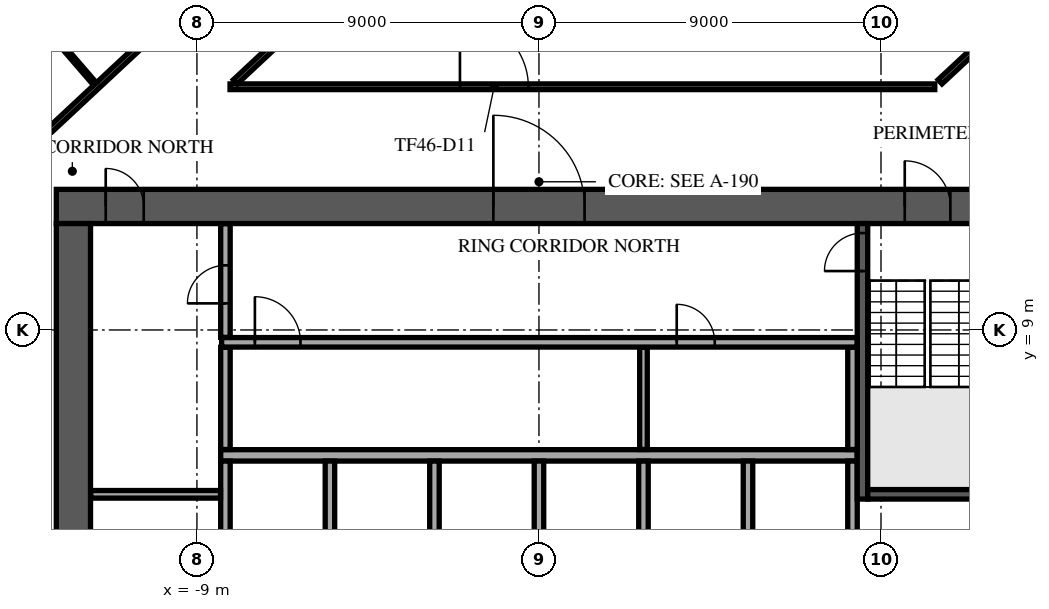
"""IFC4 building model, lengths in metres.
Left out: names, types, materials, properties, quantities, classifications, styles, units other than length and angle.
Written with IfcOpenShell. Run it as: python <this file> out.ifc"""

import sys

from ifc_helpers import new_model, si_unit, direction, frame, frame_2d, origin, place, context, subcontext, project, spatial, rectangle, extrude, element, fill, save


model = new_model("IFC4")
c1 = context("Model", 3, precision=1e-05, world=origin(), true_north=direction((0.0, 1.0)))
c2 = subcontext(c1, "Body", "Model", "MODEL_VIEW")
j1 = project(units=[si_unit("LENGTHUNIT", "METRE"), si_unit("PLANEANGLEUNIT", "RADIAN")], contexts=[c1])
p1 = place(None, origin())
s1 = spatial("IfcSite", under=j1, at=p1, CompositionType="ELEMENT")
p2 = place(p1, origin())
s2 = spatial("IfcBuilding", under=s1, at=p2, CompositionType="ELEMENT")
p3 = place(p2, frame((0.0, 0.0, 197.3)))
s3 = spatial("IfcBuildingStorey", under=s2, at=p3, CompositionType="ELEMENT", Elevation=197.3)
p4 = place(p3, frame((-12.7, 12.25, 0.0), z_axis=(0.0, 0.0, 1.0), x_axis=(1.0, 0.0, 0.0)))
e1 = element("IfcWall", 1, at=p4, inside=s3, PredefinedType="SHEAR", context=c2, shape_type="SweptSolid", body=[
    extrude(rectangle(XDim=25.4, YDim=0.9, at=frame_2d((12.7, 0.0))), origin(), (0.0, 0.0, 1.0), 3.62),
])
p5 = place(p4, frame((11.5, 0.0, 0.0)))
e2 = element("IfcOpeningElement", 2, at=p5, cuts=e1, PredefinedType="OPENING", context=c2, shape_type="SweptSolid", body=[
    extrude(rectangle(XDim=2.4, YDim=2.4, at=frame_2d((1.2, 1.2))), frame((0.0, 0.46, 0.0), z_axis=(0.0, -1.0, 0.0), x_axis=(1.0, 0.0, 0.0)), (0.0, 0.0, 1.0), 0.92),
])
p6 = place(p4, frame((22.325, 0.0, 0.0)))
e3 = element("IfcOpeningElement", 3, at=p6, cuts=e1, PredefinedType="OPENING", context=c2, shape_type="SweptSolid", body=[
    extrude(rectangle(XDim=1.2, YDim=2.1, at=frame_2d((0.6, 1.05))), frame((0.0, 0.46, 0.0), z_axis=(0.0, -1.0, 0.0), x_axis=(1.0, 0.0, 0.0)), (0.0, 0.0, 1.0), 0.92),
])
p7 = place(p4, frame((1.3, 0.0, 0.0)))
e4 = element("IfcOpeningElement", 4, at=p7, cuts=e1, PredefinedType="OPENING", context=c2, shape_type="SweptSolid", body=[
    extrude(rectangle(XDim=1.0, YDim=2.1, at=frame_2d((0.5, 1.05))), frame((0.0, 0.46, 0.0), z_axis=(0.0, -1.0, 0.0), x_axis=(1.0, 0.0, 0.0)), (0.0, 0.0, 1.0), 0.92),
])
p8 = place(p3, frame((-12.25, -11.8, 0.0), z_axis=(0.0, 0.0, 1.0), x_axis=(0.0, 1.0, 0.0)))
e5 = element("IfcWall", 5, at=p8, inside=s3, PredefinedType="SHEAR", context=c2, shape_type="SweptSolid", body=[
    extrude(rectangle(XDim=23.6, YDim=0.9, at=frame_2d((11.8, 0.0))), origin(), (0.0, 0.0, 1.0), 3.62),
])
p9 = place(p8, frame((10.6, 0.0, 0.0)))
e6 = element("IfcOpeningElement", 6, at=p9, cuts=e5, PredefinedType="OPENING", context=c2, shape_type="SweptSolid", body=[
    extrude(rectangle(XDim=2.4, YDim=2.4, at=frame_2d((1.2, 1.2))), frame((0.0, 0.46, 0.0), z_axis=(0.0, -1.0, 0.0), x_axis=(1.0, 0.0, 0.0)), (0.0, 0.0, 1.0), 0.92),
])
p10 = place(p3, frame((-8.375, 5.7, 0.0), z_axis=(0.0, 0.0, 1.0), x_axis=(1.0, 0.0, 0.0)))
e7 = element("IfcWall", 7, at=p10, inside=s3, PredefinedType="SOLIDWALL", context=c2, shape_type="SweptSolid", body=[
    extrude(rectangle(XDim=16.75, YDim=0.3, at=frame_2d((8.375, 0.0))), origin(), (0.0, 0.0, 1.0), 3.62),
])
for number, where, z_axis, x_axis in (
    (8, (-8.25, 2.85, 0.0), (0.0, 0.0, 1.0), (0.0, 1.0, 0.0)),
    (9, (-5.5, 2.85, 0.0), (0.0, 0.0, 1.0), (0.0, 1.0, 0.0)),
    (10, (-2.75, 2.85, 0.0), (0.0, 0.0, 1.0), (0.0, 1.0, 0.0)),
    (11, (0.0, 2.85, 0.0), (0.0, 0.0, 1.0), (0.0, 1.0, 0.0)),
    (12, (2.75, 2.85, 0.0), (0.0, 0.0, 1.0), (0.0, 1.0, 0.0)),
    (13, (5.5, 2.85, 0.0), (0.0, 0.0, 1.0), (0.0, 1.0, 0.0)),
    (14, (8.25, 2.85, 0.0), (0.0, 0.0, 1.0), (0.0, 1.0, 0.0)),
):
    element("IfcWall", number, at=place(p3, frame(where, z_axis=z_axis, x_axis=x_axis)), inside=s3, PredefinedType="SOLIDWALL", context=c2, shape_type="SweptSolid", body=[
        extrude(rectangle(XDim=2.7, YDim=0.25, at=frame_2d((1.35, 0.0))), origin(), (0.0, 0.0, 1.0), 3.62),
    ])
p11 = place(p3, frame((8.512, 4.55, 0.0), z_axis=(0.0, 0.0, 1.0), x_axis=(0.0, 1.0, 0.0)))
e15 = element("IfcWall", 15, at=p11, inside=s3, PredefinedType="SOLIDWALL", context=c2, shape_type="SweptSolid", body=[
    extrude(rectangle(XDim=7.25, YDim=0.275, at=frame_2d((3.625, 0.0))), origin(), (0.0, 0.0, 1.0), 3.62),
])
p12 = place(p11, frame((6.0, 0.0, 0.0)))
e16 = element("IfcOpeningElement", 16, at=p12, cuts=e15, PredefinedType="OPENING", context=c2, shape_type="SweptSolid", body=[
    extrude(rectangle(XDim=1.0, YDim=2.1, at=frame_2d((0.5, 1.05))), frame((0.0, 0.147, 0.0), z_axis=(0.0, -1.0, 0.0), x_axis=(1.0, 0.0, 0.0)), (0.0, 0.0, 1.0), 0.295),
])
p13 = place(p3, frame((8.65, 4.675, 0.0), z_axis=(0.0, 0.0, 1.0), x_axis=(1.0, 0.0, 0.0)))
e17 = element("IfcWall", 17, at=p13, inside=s3, PredefinedType="SOLIDWALL", context=c2, shape_type="SweptSolid", body=[
    extrude(rectangle(XDim=3.15, YDim=0.25, at=frame_2d((1.575, 0.0))), origin(), (0.0, 0.0, 1.0), 3.62),
])
p14 = place(p3, frame((-11.795, 4.675, 0.0), z_axis=(0.0, 0.0, 1.0), x_axis=(1.0, 0.0, 0.0)))
e18 = element("IfcWall", 18, at=p14, inside=s3, PredefinedType="PARTITIONING", context=c2, shape_type="SweptSolid", body=[
    extrude(rectangle(XDim=3.415, YDim=0.2, at=frame_2d((1.708, 0.0))), origin(), (0.0, 0.0, 1.0), 3.62),
])
p15 = place(p3, frame((-8.25, 5.855, 0.0), z_axis=(0.0, 0.0, 1.0), x_axis=(0.0, 1.0, 0.0)))
e19 = element("IfcWall", 19, at=p15, inside=s3, PredefinedType="PARTITIONING", context=c2, shape_type="SweptSolid", body=[
    extrude(rectangle(XDim=2.69, YDim=0.25, at=frame_2d((1.345, 0.0))), origin(), (0.0, 0.0, 1.0), 3.62),
])
p16 = place(p3, frame((2.75, 5.855, 0.0), z_axis=(0.0, 0.0, 1.0), x_axis=(0.0, 1.0, 0.0)))
e20 = element("IfcWall", 20, at=p16, inside=s3, PredefinedType="PARTITIONING", context=c2, shape_type="SweptSolid", body=[
    extrude(rectangle(XDim=2.69, YDim=0.2, at=frame_2d((1.345, 0.0))), origin(), (0.0, 0.0, 1.0), 3.62),
])
p17 = place(p3, frame((8.25, 5.855, 0.0), z_axis=(0.0, 0.0, 1.0), x_axis=(0.0, 1.0, 0.0)))
e21 = element("IfcWall", 21, at=p17, inside=s3, PredefinedType="PARTITIONING", context=c2, shape_type="SweptSolid", body=[
    extrude(rectangle(XDim=2.69, YDim=0.25, at=frame_2d((1.345, 0.0))), origin(), (0.0, 0.0, 1.0), 3.62),
])
p18 = place(p3, frame((-8.35, 8.675, 0.0), z_axis=(0.0, 0.0, 1.0), x_axis=(1.0, 0.0, 0.0)))
e22 = element("IfcWall", 22, at=p18, inside=s3, PredefinedType="PARTITIONING", context=c2, shape_type="SweptSolid", body=[
    extrude(rectangle(XDim=16.72, YDim=0.25, at=frame_2d((8.36, 0.0))), origin(), (0.0, 0.0, 1.0), 3.62),
])
p19 = place(p18, frame((0.875, 0.0, 0.0)))
e23 = element("IfcOpeningElement", 23, at=p19, cuts=e22, PredefinedType="OPENING", context=c2, shape_type="SweptSolid", body=[
    extrude(rectangle(XDim=1.2, YDim=2.1, at=frame_2d((0.6, 1.05))), frame((0.0, 0.135, 0.0), z_axis=(0.0, -1.0, 0.0), x_axis=(1.0, 0.0, 0.0)), (0.0, 0.0, 1.0), 0.27),
])
p20 = place(p18, frame((11.975, 0.0, 0.0)))
e24 = element("IfcOpeningElement", 24, at=p20, cuts=e22, PredefinedType="OPENING", context=c2, shape_type="SweptSolid", body=[
    extrude(rectangle(XDim=1.0, YDim=2.1, at=frame_2d((0.5, 1.05))), frame((0.0, 0.135, 0.0), z_axis=(0.0, -1.0, 0.0), x_axis=(1.0, 0.0, 0.0)), (0.0, 0.0, 1.0), 0.27),
])
p21 = place(p3, frame((-8.25, 8.805, 0.0), z_axis=(0.0, 0.0, 1.0), x_axis=(0.0, 1.0, 0.0)))
e25 = element("IfcWall", 25, at=p21, inside=s3, PredefinedType="PARTITIONING", context=c2, shape_type="SweptSolid", body=[
    extrude(rectangle(XDim=2.99, YDim=0.25, at=frame_2d((1.495, 0.0))), origin(), (0.0, 0.0, 1.0), 3.62),
])
p22 = place(p21, frame((0.895, 0.0, 0.0)))
e26 = element("IfcOpeningElement", 26, at=p22, cuts=e25, PredefinedType="OPENING", context=c2, shape_type="SweptSolid", body=[
    extrude(rectangle(XDim=1.0, YDim=2.1, at=frame_2d((0.5, 1.05))), frame((0.0, 0.135, 0.0), z_axis=(0.0, -1.0, 0.0), x_axis=(1.0, 0.0, 0.0)), (0.0, 0.0, 1.0), 0.27),
])
p23 = place(p3, frame((1.073, 34.773, 0.0), z_axis=(0.0, 0.0, 1.0), x_axis=(-0.731351780381, -0.682000420333, 0.0)))
e27 = element("IfcWall", 27, at=p23, inside=s3, PredefinedType="STANDARD", context=c2, shape_type="SweptSolid", body=[
    extrude(rectangle(XDim=49.0, YDim=0.6, at=frame_2d((24.5, 0.0))), origin(), (0.0, 0.0, 1.0), 3.62),
])
p24 = place(p23, frame((1.227, 0.0, 0.9)))
e28 = element("IfcOpeningElement", 28, at=p24, cuts=e27, PredefinedType="OPENING", context=c2, shape_type="SweptSolid", body=[
    extrude(rectangle(XDim=2.0, YDim=2.1, at=frame_2d((1.0, 1.05))), frame((0.0, 0.31, 0.0), z_axis=(0.0, -1.0, 0.0), x_axis=(1.0, 0.0, 0.0)), (0.0, 0.0, 1.0), 0.62),
])
p25 = place(p23, frame((5.682, 0.0, 0.9)))
e29 = element("IfcOpeningElement", 29, at=p25, cuts=e27, PredefinedType="OPENING", context=c2, shape_type="SweptSolid", body=[
    extrude(rectangle(XDim=2.0, YDim=2.1, at=frame_2d((1.0, 1.05))), frame((0.0, 0.31, 0.0), z_axis=(0.0, -1.0, 0.0), x_axis=(1.0, 0.0, 0.0)), (0.0, 0.0, 1.0), 0.62),
])
p26 = place(p23, frame((14.591, 0.0, 0.9)))
e30 = element("IfcOpeningElement", 30, at=p26, cuts=e27, PredefinedType="OPENING", context=c2, shape_type="SweptSolid", body=[
    extrude(rectangle(XDim=2.0, YDim=2.1, at=frame_2d((1.0, 1.05))), frame((0.0, 0.31, 0.0), z_axis=(0.0, -1.0, 0.0), x_axis=(1.0, 0.0, 0.0)), (0.0, 0.0, 1.0), 0.62),
])
p27 = place(p23, frame((19.045, 0.0, 0.9)))
e31 = element("IfcOpeningElement", 31, at=p27, cuts=e27, PredefinedType="OPENING", context=c2, shape_type="SweptSolid", body=[
    extrude(rectangle(XDim=2.0, YDim=2.1, at=frame_2d((1.0, 1.05))), frame((0.0, 0.31, 0.0), z_axis=(0.0, -1.0, 0.0), x_axis=(1.0, 0.0, 0.0)), (0.0, 0.0, 1.0), 0.62),
])
p28 = place(p23, frame((23.5, 0.0, 0.9)))
e32 = element("IfcOpeningElement", 32, at=p28, cuts=e27, PredefinedType="OPENING", context=c2, shape_type="SweptSolid", body=[
    extrude(rectangle(XDim=2.0, YDim=2.1, at=frame_2d((1.0, 1.05))), frame((0.0, 0.31, 0.0), z_axis=(0.0, -1.0, 0.0), x_axis=(1.0, 0.0, 0.0)), (0.0, 0.0, 1.0), 0.62),
])
p29 = place(p23, frame((27.955, 0.0, 0.9)))
e33 = element("IfcOpeningElement", 33, at=p29, cuts=e27, PredefinedType="OPENING", context=c2, shape_type="SweptSolid", body=[
    extrude(rectangle(XDim=2.0, YDim=2.1, at=frame_2d((1.0, 1.05))), frame((0.0, 0.31, 0.0), z_axis=(0.0, -1.0, 0.0), x_axis=(1.0, 0.0, 0.0)), (0.0, 0.0, 1.0), 0.62),
])
p30 = place(p23, frame((32.409, 0.0, 0.9)))
e34 = element("IfcOpeningElement", 34, at=p30, cuts=e27, PredefinedType="OPENING", context=c2, shape_type="SweptSolid", body=[
    extrude(rectangle(XDim=2.0, YDim=2.1, at=frame_2d((1.0, 1.05))), frame((0.0, 0.31, 0.0), z_axis=(0.0, -1.0, 0.0), x_axis=(1.0, 0.0, 0.0)), (0.0, 0.0, 1.0), 0.62),
])
p31 = place(p23, frame((36.864, 0.0, 0.9)))
e35 = element("IfcOpeningElement", 35, at=p31, cuts=e27, PredefinedType="OPENING", context=c2, shape_type="SweptSolid", body=[
    extrude(rectangle(XDim=2.0, YDim=2.1, at=frame_2d((1.0, 1.05))), frame((0.0, 0.31, 0.0), z_axis=(0.0, -1.0, 0.0), x_axis=(1.0, 0.0, 0.0)), (0.0, 0.0, 1.0), 0.62),
])
p32 = place(p23, frame((41.318, 0.0, 0.9)))
e36 = element("IfcOpeningElement", 36, at=p32, cuts=e27, PredefinedType="OPENING", context=c2, shape_type="SweptSolid", body=[
    extrude(rectangle(XDim=2.0, YDim=2.1, at=frame_2d((1.0, 1.05))), frame((0.0, 0.31, 0.0), z_axis=(0.0, -1.0, 0.0), x_axis=(1.0, 0.0, 0.0)), (0.0, 0.0, 1.0), 0.62),
])
p33 = place(p23, frame((45.773, 0.0, 0.9)))
e37 = element("IfcOpeningElement", 37, at=p33, cuts=e27, PredefinedType="OPENING", context=c2, shape_type="SweptSolid", body=[
    extrude(rectangle(XDim=2.0, YDim=2.1, at=frame_2d((1.0, 1.05))), frame((0.0, 0.31, 0.0), z_axis=(0.0, -1.0, 0.0), x_axis=(1.0, 0.0, 0.0)), (0.0, 0.0, 1.0), 0.62),
])
p34 = place(p3, frame((35.02, 5.994, 0.0), z_axis=(0.0, 0.0, 1.0), x_axis=(-0.682002361324, 0.731349970362, 0.0)))
e38 = element("IfcWall", 38, at=p34, inside=s3, PredefinedType="STANDARD", context=c2, shape_type="SweptSolid", body=[
    extrude(rectangle(XDim=39.0, YDim=0.6, at=frame_2d((19.5, 0.0))), origin(), (0.0, 0.0, 1.0), 3.62),
])
p35 = place(p34, frame((1.217, 0.0, 0.9)))
e39 = element("IfcOpeningElement", 39, at=p35, cuts=e38, PredefinedType="OPENING", context=c2, shape_type="SweptSolid", body=[
    extrude(rectangle(XDim=1.9, YDim=2.1, at=frame_2d((0.95, 1.05))), frame((0.0, 0.31, 0.0), z_axis=(0.0, -1.0, 0.0), x_axis=(1.0, 0.0, 0.0)), (0.0, 0.0, 1.0), 0.62),
])
p36 = place(p34, frame((5.55, 0.0, 0.9)))
e40 = element("IfcOpeningElement", 40, at=p36, cuts=e38, PredefinedType="OPENING", context=c2, shape_type="SweptSolid", body=[
    extrude(rectangle(XDim=1.9, YDim=2.1, at=frame_2d((0.95, 1.05))), frame((0.0, 0.31, 0.0), z_axis=(0.0, -1.0, 0.0), x_axis=(1.0, 0.0, 0.0)), (0.0, 0.0, 1.0), 0.62),
])
p37 = place(p34, frame((9.883, 0.0, 0.9)))
e41 = element("IfcOpeningElement", 41, at=p37, cuts=e38, PredefinedType="OPENING", context=c2, shape_type="SweptSolid", body=[
    extrude(rectangle(XDim=1.9, YDim=2.1, at=frame_2d((0.95, 1.05))), frame((0.0, 0.31, 0.0), z_axis=(0.0, -1.0, 0.0), x_axis=(1.0, 0.0, 0.0)), (0.0, 0.0, 1.0), 0.62),
])
p38 = place(p34, frame((14.217, 0.0, 0.9)))
e42 = element("IfcOpeningElement", 42, at=p38, cuts=e38, PredefinedType="OPENING", context=c2, shape_type="SweptSolid", body=[
    extrude(rectangle(XDim=1.9, YDim=2.1, at=frame_2d((0.95, 1.05))), frame((0.0, 0.31, 0.0), z_axis=(0.0, -1.0, 0.0), x_axis=(1.0, 0.0, 0.0)), (0.0, 0.0, 1.0), 0.62),
])
p39 = place(p34, frame((18.55, 0.0, 0.9)))
e43 = element("IfcOpeningElement", 43, at=p39, cuts=e38, PredefinedType="OPENING", context=c2, shape_type="SweptSolid", body=[
    extrude(rectangle(XDim=1.9, YDim=2.1, at=frame_2d((0.95, 1.05))), frame((0.0, 0.31, 0.0), z_axis=(0.0, -1.0, 0.0), x_axis=(1.0, 0.0, 0.0)), (0.0, 0.0, 1.0), 0.62),
])
p40 = place(p34, frame((22.883, 0.0, 0.9)))
e44 = element("IfcOpeningElement", 44, at=p40, cuts=e38, PredefinedType="OPENING", context=c2, shape_type="SweptSolid", body=[
    extrude(rectangle(XDim=1.9, YDim=2.1, at=frame_2d((0.95, 1.05))), frame((0.0, 0.31, 0.0), z_axis=(0.0, -1.0, 0.0), x_axis=(1.0, 0.0, 0.0)), (0.0, 0.0, 1.0), 0.62),
])
p41 = place(p34, frame((27.217, 0.0, 0.9)))
e45 = element("IfcOpeningElement", 45, at=p41, cuts=e38, PredefinedType="OPENING", context=c2, shape_type="SweptSolid", body=[
    extrude(rectangle(XDim=1.9, YDim=2.1, at=frame_2d((0.95, 1.05))), frame((0.0, 0.31, 0.0), z_axis=(0.0, -1.0, 0.0), x_axis=(1.0, 0.0, 0.0)), (0.0, 0.0, 1.0), 0.62),
])
p42 = place(p34, frame((31.55, 0.0, 0.9)))
e46 = element("IfcOpeningElement", 46, at=p42, cuts=e38, PredefinedType="OPENING", context=c2, shape_type="SweptSolid", body=[
    extrude(rectangle(XDim=1.9, YDim=2.1, at=frame_2d((0.95, 1.05))), frame((0.0, 0.31, 0.0), z_axis=(0.0, -1.0, 0.0), x_axis=(1.0, 0.0, 0.0)), (0.0, 0.0, 1.0), 0.62),
])
p43 = place(p34, frame((35.883, 0.0, 0.9)))
e47 = element("IfcOpeningElement", 47, at=p43, cuts=e38, PredefinedType="OPENING", context=c2, shape_type="SweptSolid", body=[
    extrude(rectangle(XDim=1.9, YDim=2.1, at=frame_2d((0.95, 1.05))), frame((0.0, 0.31, 0.0), z_axis=(0.0, -1.0, 0.0), x_axis=(1.0, 0.0, 0.0)), (0.0, 0.0, 1.0), 0.62),
])
p44 = place(p3, frame((-24.623, 3.301, 0.0), z_axis=(0.0, 0.0, 1.0), x_axis=(0.731351215564, 0.68200102602, 0.0)))
e48 = element("IfcWall", 48, at=p44, inside=s3, PredefinedType="PARTITIONING", context=c2, shape_type="SweptSolid", body=[
    extrude(rectangle(XDim=31.513, YDim=0.15, at=frame_2d((15.757, 0.0))), origin(), (0.0, 0.0, 1.0), 3.17),
])
p45 = place(p44, frame((1.05, 0.0, 0.0)))
e49 = element("IfcOpeningElement", 49, at=p45, cuts=e48, PredefinedType="OPENING", context=c2, shape_type="SweptSolid", body=[
    extrude(rectangle(XDim=1.8, YDim=2.1, at=frame_2d((0.9, 1.05))), frame((0.0, 0.085, 0.0), z_axis=(0.0, -1.0, 0.0), x_axis=(1.0, 0.0, 0.0)), (0.0, 0.0, 1.0), 0.17),
])
p46 = place(p44, frame((5.55, 0.0, 0.0)))
e50 = element("IfcOpeningElement", 50, at=p46, cuts=e48, PredefinedType="OPENING", context=c2, shape_type="SweptSolid", body=[
    extrude(rectangle(XDim=1.0, YDim=2.1, at=frame_2d((0.5, 1.05))), frame((0.0, 0.085, 0.0), z_axis=(0.0, -1.0, 0.0), x_axis=(1.0, 0.0, 0.0)), (0.0, 0.0, 1.0), 0.17),
])
p47 = place(p44, frame((10.917, 0.0, 0.0)))
e51 = element("IfcOpeningElement", 51, at=p47, cuts=e48, PredefinedType="OPENING", context=c2, shape_type="SweptSolid", body=[
    extrude(rectangle(XDim=1.0, YDim=2.1, at=frame_2d((0.5, 1.05))), frame((0.0, 0.085, 0.0), z_axis=(0.0, -1.0, 0.0), x_axis=(1.0, 0.0, 0.0)), (0.0, 0.0, 1.0), 0.17),
])
p48 = place(p44, frame((20.812, 0.0, 0.0)))
e52 = element("IfcOpeningElement", 52, at=p48, cuts=e48, PredefinedType="OPENING", context=c2, shape_type="SweptSolid", body=[
    extrude(rectangle(XDim=1.0, YDim=2.1, at=frame_2d((0.5, 1.05))), frame((0.0, 0.085, 0.0), z_axis=(0.0, -1.0, 0.0), x_axis=(1.0, 0.0, 0.0)), (0.0, 0.0, 1.0), 0.17),
])
p49 = place(p3, frame((-8.129, 15.4, 0.0), z_axis=(0.0, 0.0, 1.0), x_axis=(1.0, 0.0, 0.0)))
e53 = element("IfcWall", 53, at=p49, inside=s3, PredefinedType="PARTITIONING", context=c2, shape_type="SweptSolid", body=[
    extrude(rectangle(XDim=18.544, YDim=0.15, at=frame_2d((9.272, 0.0))), origin(), (0.0, 0.0, 1.0), 3.17),
])
p50 = place(p49, frame((6.05, 0.0, 0.0)))
e54 = element("IfcOpeningElement", 54, at=p50, cuts=e53, PredefinedType="OPENING", context=c2, shape_type="SweptSolid", body=[
    extrude(rectangle(XDim=1.8, YDim=2.1, at=frame_2d((0.9, 1.05))), frame((0.0, 0.085, 0.0), z_axis=(0.0, -1.0, 0.0), x_axis=(1.0, 0.0, 0.0)), (0.0, 0.0, 1.0), 0.17),
])
p51 = place(p3, frame((-7.99, 15.53, 0.0), z_axis=(0.0, 0.0, 1.0), x_axis=(0.731318077891, 0.682036559834, 0.0)))
e55 = element("IfcWall", 55, at=p51, inside=s3, PredefinedType="PARTITIONING", context=c2, shape_type="SweptSolid", body=[
    extrude(rectangle(XDim=10.934, YDim=0.15, at=frame_2d((5.467, 0.0))), origin(), (0.0, 0.0, 1.0), 3.17),
])
p52 = place(p3, frame((8.535, 23.042, 0.0), z_axis=(0.0, 0.0, 1.0), x_axis=(0.68201130552, -0.73134162957, 0.0)))
e56 = element("IfcWall", 56, at=p52, inside=s3, PredefinedType="PARTITIONING", context=c2, shape_type="SweptSolid", body=[
    extrude(rectangle(XDim=22.137, YDim=0.15, at=frame_2d((11.069, 0.0))), origin(), (0.0, 0.0, 1.0), 3.17),
])
p53 = place(p52, frame((1.55, 0.0, 0.0)))
e57 = element("IfcOpeningElement", 57, at=p53, cuts=e56, PredefinedType="OPENING", context=c2, shape_type="SweptSolid", body=[
    extrude(rectangle(XDim=1.0, YDim=2.1, at=frame_2d((0.5, 1.05))), frame((0.0, 0.085, 0.0), z_axis=(0.0, -1.0, 0.0), x_axis=(1.0, 0.0, 0.0)), (0.0, 0.0, 1.0), 0.17),
])
p54 = place(p52, frame((8.485, 0.0, 0.0)))
e58 = element("IfcOpeningElement", 58, at=p54, cuts=e56, PredefinedType="OPENING", context=c2, shape_type="SweptSolid", body=[
    extrude(rectangle(XDim=1.0, YDim=2.1, at=frame_2d((0.5, 1.05))), frame((0.0, 0.085, 0.0), z_axis=(0.0, -1.0, 0.0), x_axis=(1.0, 0.0, 0.0)), (0.0, 0.0, 1.0), 0.17),
])
p55 = place(p3, frame((10.554, 15.53, 0.0), z_axis=(0.0, 0.0, 1.0), x_axis=(0.731445889193, 0.681899487596, 0.0)))
e59 = element("IfcWall", 59, at=p55, inside=s3, PredefinedType="PARTITIONING", context=c2, shape_type="SweptSolid", body=[
    extrude(rectangle(XDim=1.247, YDim=0.15, at=frame_2d((0.623, 0.0))), origin(), (0.0, 0.0, 1.0), 3.17),
])
p56 = place(p3, frame((-15.027, 19.347, 0.0), z_axis=(0.0, 0.0, 1.0), x_axis=(0.653552799086, -0.75688092776, 0.0)))
e60 = element("IfcWall", 60, at=p56, inside=s3, PredefinedType="PARTITIONING", context=c2, shape_type="SweptSolid", body=[
    extrude(rectangle(XDim=5.118, YDim=0.1, at=frame_2d((2.559, 0.0))), origin(), (0.0, 0.0, 1.0), 2.97),
])
p57 = place(p5, origin())
e61 = element("IfcDoor", 61, at=p57, inside=s3, OperationType="SINGLE_SWING_LEFT", PredefinedType="DOOR", context=c2, shape_type="SweptSolid", body=[
    extrude(rectangle(XDim=2.4, YDim=2.4, at=frame_2d((1.2, 1.2))), frame((0.0, 0.025, 0.0), z_axis=(0.0, -1.0, 0.0), x_axis=(1.0, 0.0, 0.0)), (0.0, 0.0, 1.0), 0.05),
])
fill(e2, e61)
p58 = place(p6, origin())
e62 = element("IfcDoor", 62, at=p58, inside=s3, OperationType="SINGLE_SWING_LEFT", PredefinedType="DOOR", context=c2, shape_type="SweptSolid", body=[
    extrude(rectangle(XDim=1.2, YDim=2.1, at=frame_2d((0.6, 1.05))), frame((0.0, 0.025, 0.0), z_axis=(0.0, -1.0, 0.0), x_axis=(1.0, 0.0, 0.0)), (0.0, 0.0, 1.0), 0.05),
])
fill(e3, e62)
p59 = place(p7, origin())
e63 = element("IfcDoor", 63, at=p59, inside=s3, OperationType="SINGLE_SWING_LEFT", PredefinedType="DOOR", context=c2, shape_type="SweptSolid", body=[
    extrude(rectangle(XDim=1.0, YDim=2.1, at=frame_2d((0.5, 1.05))), frame((0.0, 0.025, 0.0), z_axis=(0.0, -1.0, 0.0), x_axis=(1.0, 0.0, 0.0)), (0.0, 0.0, 1.0), 0.05),
])
fill(e4, e63)
p60 = place(p12, origin())
e64 = element("IfcDoor", 64, at=p60, inside=s3, OperationType="SINGLE_SWING_LEFT", PredefinedType="DOOR", context=c2, shape_type="SweptSolid", body=[
    extrude(rectangle(XDim=1.0, YDim=2.1, at=frame_2d((0.5, 1.05))), frame((0.0, 0.025, 0.0), z_axis=(0.0, -1.0, 0.0), x_axis=(1.0, 0.0, 0.0)), (0.0, 0.0, 1.0), 0.05),
])
fill(e16, e64)
p61 = place(p22, origin())
e65 = element("IfcDoor", 65, at=p61, inside=s3, OperationType="SINGLE_SWING_LEFT", PredefinedType="DOOR", context=c2, shape_type="SweptSolid", body=[
    extrude(rectangle(XDim=1.0, YDim=2.1, at=frame_2d((0.5, 1.05))), frame((0.0, 0.025, 0.0), z_axis=(0.0, -1.0, 0.0), x_axis=(1.0, 0.0, 0.0)), (0.0, 0.0, 1.0), 0.05),
])
fill(e26, e65)
p62 = place(p19, origin())
e66 = element("IfcDoor", 66, at=p62, inside=s3, OperationType="SINGLE_SWING_LEFT", PredefinedType="DOOR", context=c2, shape_type="SweptSolid", body=[
    extrude(rectangle(XDim=1.2, YDim=2.1, at=frame_2d((0.6, 1.05))), frame((0.0, 0.025, 0.0), z_axis=(0.0, -1.0, 0.0), x_axis=(1.0, 0.0, 0.0)), (0.0, 0.0, 1.0), 0.05),
])
fill(e23, e66)
p63 = place(p20, origin())
e67 = element("IfcDoor", 67, at=p63, inside=s3, OperationType="SINGLE_SWING_LEFT", PredefinedType="DOOR", context=c2, shape_type="SweptSolid", body=[
    extrude(rectangle(XDim=1.0, YDim=2.1, at=frame_2d((0.5, 1.05))), frame((0.0, 0.025, 0.0), z_axis=(0.0, -1.0, 0.0), x_axis=(1.0, 0.0, 0.0)), (0.0, 0.0, 1.0), 0.05),
])
fill(e24, e67)
p64 = place(p50, origin())
e68 = element("IfcDoor", 68, at=p64, inside=s3, OperationType="DOUBLE_DOOR_SINGLE_SWING", PredefinedType="DOOR", context=c2, shape_type="SweptSolid", body=[
    extrude(rectangle(XDim=1.8, YDim=2.1, at=frame_2d((0.9, 1.05))), frame((0.0, 0.025, 0.0), z_axis=(0.0, -1.0, 0.0), x_axis=(1.0, 0.0, 0.0)), (0.0, 0.0, 1.0), 0.05),
])
fill(e54, e68)
save(model, sys.argv[1])
